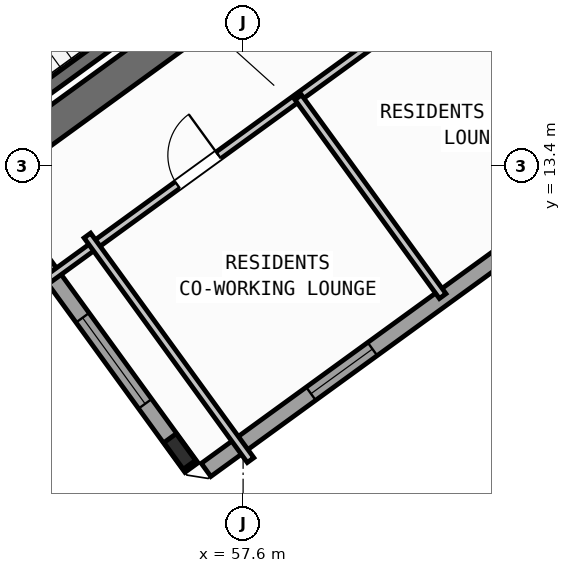
"""IFC4 building model, lengths in metres.
Left out: names, types, materials, properties, quantities, classifications, styles, units other than length and angle.
Written with IfcOpenShell. Run it as: python <this file> out.ifc"""

import sys

from ifc_helpers import new_model, si_unit, direction, frame, frame_2d, origin, origin_2d, place, context, subcontext, project, spatial, rectangle, i_section, extrude, source, transform, mapped, element, fill, save


model = new_model("IFC4")
c1 = context("Model", 3, precision=1e-05, world=origin(), true_north=direction((0.0, 1.0)))
c2 = subcontext(c1, "Body", "Model", "MODEL_VIEW")
j1 = project(units=[si_unit("LENGTHUNIT", "METRE"), si_unit("PLANEANGLEUNIT", "RADIAN")], contexts=[c1])
p1 = place(None, origin())
s1 = spatial("IfcSite", under=j1, at=p1, CompositionType="ELEMENT")
p2 = place(p1, origin())
s2 = spatial("IfcBuilding", under=s1, at=p2, CompositionType="ELEMENT")
p3 = place(p2, frame((0.0, 0.0, 34.8)))
s3 = spatial("IfcBuildingStorey", under=s2, at=p3, CompositionType="ELEMENT", Elevation=34.8)
p4 = place(p3, frame((52.318, 13.11, 0.0), z_axis=(0.0, 0.0, 1.0), x_axis=(0.809019445368, 0.587781878776, 0.0)))
e1 = element("IfcWall", 1, at=p4, inside=s3, PredefinedType="SHEAR", context=c2, shape_type="SweptSolid", body=[
    extrude(rectangle(XDim=12.44, YDim=0.65, at=frame_2d((6.22, 0.0))), origin(), (0.0, 0.0, 1.0), 3.35),
])
m1 = source(origin(), c2, "Body", "SweptSolid", [
    extrude(i_section(OverallWidth=0.3, OverallDepth=0.65, WebThickness=0.016, FlangeThickness=0.031, at=origin_2d()), origin(), (0.0, 0.0, 1.0), 3.6),
])
p5 = place(p3, frame((56.35, 7.758, 0.0), z_axis=(0.0, 0.0, 1.0), x_axis=(0.809016994375, 0.587785252292, 0.0)))
e2 = element("IfcColumn", 2, at=p5, inside=s3, PredefinedType="COLUMN", context=c2, shape_type="MappedRepresentation", body=[
    mapped(m1, transform((0.0, 0.0, 0.0), scale=1.0)),
])
p6 = place(p3, frame((71.098, 17.731, 0.0), z_axis=(0.0, 0.0, 1.0), x_axis=(-0.809021120468, -0.587779573171, 0.0)))
e3 = element("IfcWall", 3, at=p6, inside=s3, PredefinedType="STANDARD", context=c2, shape_type="SweptSolid", body=[
    extrude(rectangle(XDim=17.588, YDim=0.32, at=frame_2d((8.794, 0.0))), origin(), (0.0, 0.0, 1.0), 3.35),
])
p7 = place(p6, frame((1.624, 0.0, 0.0)))
e4 = element("IfcOpeningElement", 4, at=p7, cuts=e3, PredefinedType="OPENING", context=c2, shape_type="SweptSolid", body=[
    extrude(rectangle(XDim=1.05, YDim=2.15, at=frame_2d((0.525, 1.075))), frame((0.0, 0.17, 0.0), z_axis=(0.0, -1.0, 0.0), x_axis=(1.0, 0.0, 0.0)), (0.0, 0.0, 1.0), 0.34),
])
p8 = place(p6, frame((4.104, 0.0, 1.0)))
e5 = element("IfcOpeningElement", 5, at=p8, cuts=e3, PredefinedType="OPENING", context=c2, shape_type="SweptSolid", body=[
    extrude(rectangle(XDim=0.9, YDim=1.25, at=frame_2d((0.45, 0.625))), frame((0.0, 0.17, 0.0), z_axis=(0.0, -1.0, 0.0), x_axis=(1.0, 0.0, 0.0)), (0.0, 0.0, 1.0), 0.34),
])
p9 = place(p6, frame((7.879, 0.0, 0.85)))
e6 = element("IfcOpeningElement", 6, at=p9, cuts=e3, PredefinedType="OPENING", context=c2, shape_type="SweptSolid", body=[
    extrude(rectangle(XDim=1.8, YDim=1.5, at=frame_2d((0.9, 0.75))), frame((0.0, 0.17, 0.0), z_axis=(0.0, -1.0, 0.0), x_axis=(1.0, 0.0, 0.0)), (0.0, 0.0, 1.0), 0.34),
])
p10 = place(p6, frame((13.529, 0.0, 0.85)))
e7 = element("IfcOpeningElement", 7, at=p10, cuts=e3, PredefinedType="OPENING", context=c2, shape_type="SweptSolid", body=[
    extrude(rectangle(XDim=1.5, YDim=1.5, at=frame_2d((0.75, 0.75))), frame((0.0, 0.17, 0.0), z_axis=(0.0, -1.0, 0.0), x_axis=(1.0, 0.0, 0.0)), (0.0, 0.0, 1.0), 0.34),
])
p11 = place(p3, frame((56.581, 7.439, 0.0), z_axis=(0.0, 0.0, 1.0), x_axis=(-0.587785875463, 0.809016541614, 0.0)))
e8 = element("IfcWall", 8, at=p11, inside=s3, PredefinedType="STANDARD", context=c2, shape_type="SweptSolid", body=[
    extrude(rectangle(XDim=6.774, YDim=0.32, at=frame_2d((3.387, 0.0))), origin(), (0.0, 0.0, 1.0), 2.725),
])
p12 = place(p11, frame((1.556, 0.0, 0.8)))
e9 = element("IfcOpeningElement", 9, at=p12, cuts=e8, PredefinedType="OPENING", context=c2, shape_type="SweptSolid", body=[
    extrude(rectangle(XDim=2.1, YDim=1.55, at=frame_2d((1.05, 0.775))), frame((0.0, 0.17, 0.0), z_axis=(0.0, -1.0, 0.0), x_axis=(1.0, 0.0, 0.0)), (0.0, 0.0, 1.0), 0.34),
])
p13 = place(p3, frame((52.472, 14.013, 0.0), z_axis=(0.0, 0.0, 1.0), x_axis=(0.809028366311, 0.587769599847, 0.0)))
e10 = element("IfcWall", 10, at=p13, inside=s3, PredefinedType="SHEAR", context=c2, shape_type="SweptSolid", body=[
    extrude(rectangle(XDim=7.33, YDim=0.26, at=frame_2d((3.665, 0.0))), origin(), (0.0, 0.0, 1.0), 3.35),
])
p14 = place(p3, frame((53.705, 11.126, 0.0), z_axis=(0.0, 0.0, 1.0), x_axis=(0.809014504436, 0.587788679384, 0.0)))
e11 = element("IfcWall", 11, at=p14, inside=s3, PredefinedType="PARTITIONING", context=c2, shape_type="SweptSolid", body=[
    extrude(rectangle(XDim=14.67, YDim=0.16, at=frame_2d((7.335, 0.0))), origin(), (0.0, 0.0, 1.0), 3.34),
])
p15 = place(p14, frame((3.215, 0.0, 0.0)))
e12 = element("IfcOpeningElement", 12, at=p15, cuts=e11, PredefinedType="OPENING", context=c2, shape_type="SweptSolid", body=[
    extrude(rectangle(XDim=1.0, YDim=2.1, at=frame_2d((0.5, 1.05))), frame((0.0, 0.09, 0.0), z_axis=(0.0, -1.0, 0.0), x_axis=(1.0, 0.0, 0.0)), (0.0, 0.0, 1.0), 0.18),
])
p16 = place(p14, frame((9.915, 0.0, 0.0)))
e13 = element("IfcOpeningElement", 13, at=p16, cuts=e11, PredefinedType="OPENING", context=c2, shape_type="SweptSolid", body=[
    extrude(rectangle(XDim=1.0, YDim=2.1, at=frame_2d((0.5, 1.05))), frame((0.0, 0.09, 0.0), z_axis=(0.0, -1.0, 0.0), x_axis=(1.0, 0.0, 0.0)), (0.0, 0.0, 1.0), 0.18),
])
p17 = place(p3, frame((57.747, 7.586, 0.0), z_axis=(0.0, 0.0, 1.0), x_axis=(-0.587784893399, 0.809017255126, 0.0)))
e14 = element("IfcWall", 14, at=p17, inside=s3, PredefinedType="PARTITIONING", context=c2, shape_type="SweptSolid", body=[
    extrude(rectangle(XDim=5.48, YDim=0.16, at=frame_2d((2.74, 0.0))), origin(), (0.0, 0.0, 1.0), 3.34),
])
p18 = place(p3, frame((61.539, 10.823, 0.0), z_axis=(0.0, 0.0, 1.0), x_axis=(-0.587785532001, 0.809016791155, 0.0)))
e15 = element("IfcWall", 15, at=p18, inside=s3, PredefinedType="PARTITIONING", context=c2, shape_type="SweptSolid", body=[
    extrude(rectangle(XDim=4.85, YDim=0.16, at=frame_2d((2.425, 0.0))), origin(), (0.0, 0.0, 1.0), 3.34),
])
m2 = source(origin(), c2, "Body", "SweptSolid", [
    extrude(rectangle(XDim=1.5, YDim=1.5, at=frame_2d((0.75, 0.75))), frame((0.0, 0.03, 0.0), z_axis=(0.0, -1.0, 0.0), x_axis=(1.0, 0.0, 0.0)), (0.0, 0.0, 1.0), 0.06),
])
p19 = place(p10, origin())
e16 = element("IfcWindow", 16, at=p19, inside=s3, PartitioningType="SINGLE_PANEL", PredefinedType="WINDOW", context=c2, shape_type="MappedRepresentation", body=[
    mapped(m2, transform((0.0, 0.0, 0.0), scale=1.0)),
])
fill(e7, e16)
m3 = source(origin(), c2, "Body", "SweptSolid", [
    extrude(rectangle(XDim=2.1, YDim=1.55, at=frame_2d((1.05, 0.775))), frame((0.0, 0.03, 0.0), z_axis=(0.0, -1.0, 0.0), x_axis=(1.0, 0.0, 0.0)), (0.0, 0.0, 1.0), 0.06),
])
p20 = place(p12, origin())
e17 = element("IfcWindow", 17, at=p20, inside=s3, PartitioningType="SINGLE_PANEL", PredefinedType="WINDOW", context=c2, shape_type="MappedRepresentation", body=[
    mapped(m3, transform((0.0, 0.0, 0.0), scale=1.0)),
])
fill(e9, e17)
m4 = source(origin(), c2, "Body", "SweptSolid", [
    extrude(rectangle(XDim=1.0, YDim=2.1, at=frame_2d((0.5, 1.05))), frame((0.0, 0.025, 0.0), z_axis=(0.0, -1.0, 0.0), x_axis=(1.0, 0.0, 0.0)), (0.0, 0.0, 1.0), 0.05),
])
p21 = place(p15, origin())
e18 = element("IfcDoor", 18, at=p21, inside=s3, OperationType="SINGLE_SWING_RIGHT", PredefinedType="DOOR", context=c2, shape_type="MappedRepresentation", body=[
    mapped(m4, transform((0.0, 0.0, 0.0), scale=1.0)),
])
fill(e12, e18)
save(model, sys.argv[1])
